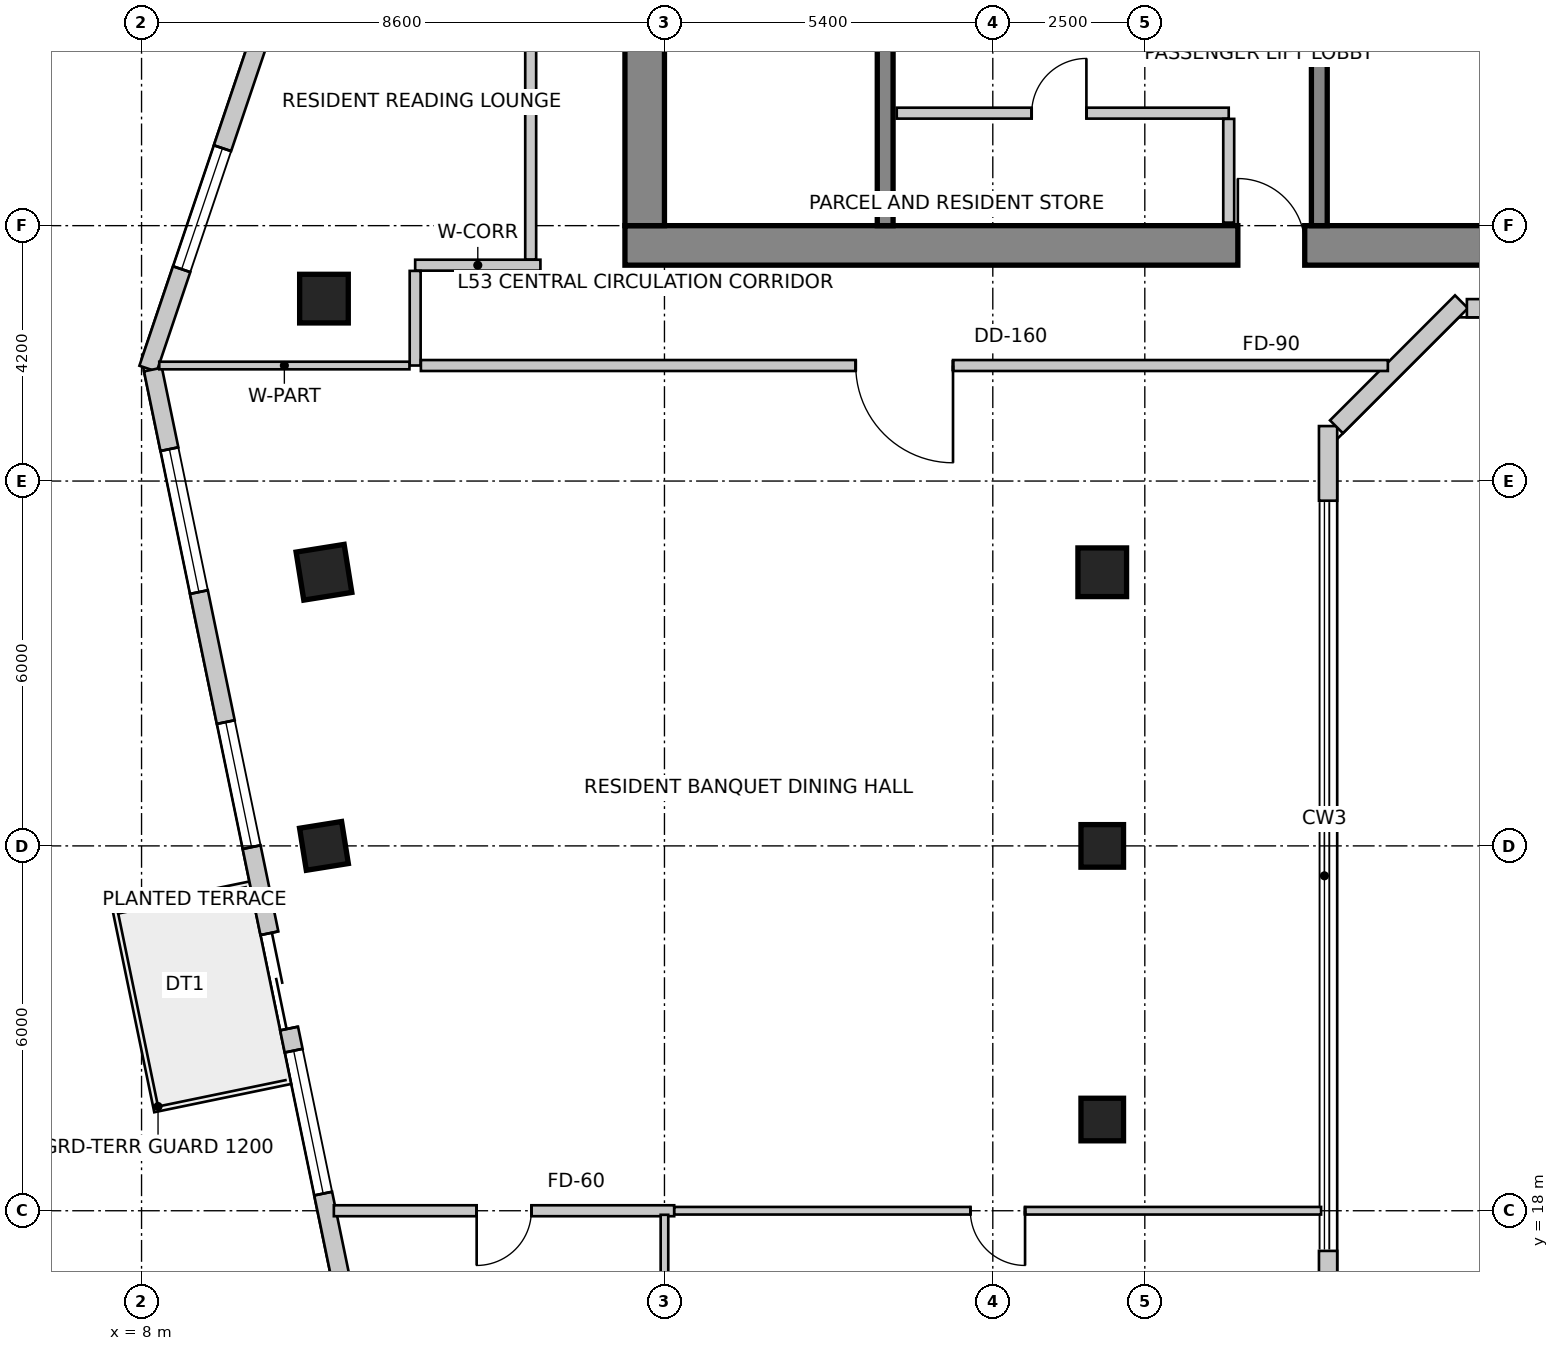
"""IFC4 building model, lengths in metres.
Left out: names, types, materials, properties, quantities, classifications, styles, units other than length and angle.
Written with IfcOpenShell. Run it as: python <this file> out.ifc"""

import sys

from ifc_helpers import new_model, si_unit, direction, frame, frame_2d, origin, origin_2d, place, context, subcontext, project, spatial, rectangle, extrude, source, transform, mapped, element, fill, save


model = new_model("IFC4")
c1 = context("Model", 3, precision=1e-05, world=origin(), true_north=direction((0.0, 1.0)))
c2 = subcontext(c1, "Body", "Model", "MODEL_VIEW")
j1 = project(units=[si_unit("LENGTHUNIT", "METRE"), si_unit("PLANEANGLEUNIT", "RADIAN")], contexts=[c1])
p1 = place(None, origin())
s1 = spatial("IfcSite", under=j1, at=p1, CompositionType="ELEMENT")
p2 = place(p1, origin())
s2 = spatial("IfcBuilding", under=s1, at=p2, CompositionType="ELEMENT")
p3 = place(p2, frame((0.0, 0.0, 211.4)))
s3 = spatial("IfcBuildingStorey", under=s2, at=p3, CompositionType="ELEMENT", Elevation=211.4)
p4 = place(p3, frame((15.95, 33.875, 0.0), z_axis=(0.0, 0.0, 1.0), x_axis=(1.0, 0.0, 0.0)))
e1 = element("IfcWall", 1, at=p4, inside=s3, PredefinedType="SHEAR", context=c2, shape_type="SweptSolid", body=[
    extrude(rectangle(XDim=15.7, YDim=0.65, at=frame_2d((7.85, 0.0))), origin(), (0.0, 0.0, 1.0), 3.5),
])
m1 = source(origin(), c2, "Body", "SweptSolid", [
    extrude(rectangle(XDim=1.1, YDim=2.15, at=frame_2d((0.55, 1.075))), frame((0.0, 0.335, 0.0), z_axis=(0.0, -1.0, 0.0), x_axis=(1.0, 0.0, 0.0)), (0.0, 0.0, 1.0), 0.67),
])
p5 = place(p4, frame((10.08, 0.0, 0.0)))
e2 = element("IfcOpeningElement", 2, at=p5, cuts=e1, PredefinedType="OPENING", context=c2, shape_type="MappedRepresentation", body=[
    mapped(m1, transform((0.0, 0.0, 0.0), scale=1.0)),
])
p6 = place(p3, frame((16.275, 34.2, 0.0), z_axis=(0.0, 0.0, 1.0), x_axis=(0.0, 1.0, 0.0)))
e3 = element("IfcWall", 3, at=p6, inside=s3, PredefinedType="SHEAR", context=c2, shape_type="SweptSolid", body=[
    extrude(rectangle(XDim=11.4, YDim=0.65, at=frame_2d((5.7, 0.0))), origin(), (0.0, 0.0, 1.0), 3.5),
])
p7 = place(p6, frame((7.15, 0.0, 0.0)))
e4 = element("IfcOpeningElement", 4, at=p7, cuts=e3, PredefinedType="OPENING", context=c2, shape_type="MappedRepresentation", body=[
    mapped(m1, transform((0.0, 0.0, 0.0), scale=1.0)),
])
p8 = place(p3, frame((20.23, 34.2, 0.0), z_axis=(0.0, 0.0, 1.0), x_axis=(0.0, 1.0, 0.0)))
e5 = element("IfcWall", 5, at=p8, inside=s3, PredefinedType="SHEAR", context=c2, shape_type="SweptSolid", body=[
    extrude(rectangle(XDim=9.06, YDim=0.26, at=frame_2d((4.53, 0.0))), origin(), (0.0, 0.0, 1.0), 3.5),
])
m2 = source(origin(), c2, "Body", "SweptSolid", [
    extrude(rectangle(XDim=1.1, YDim=2.15, at=frame_2d((0.55, 1.075))), frame((0.0, 0.14, 0.0), z_axis=(0.0, -1.0, 0.0), x_axis=(1.0, 0.0, 0.0)), (0.0, 0.0, 1.0), 0.28),
])
p9 = place(p8, frame((7.45, 0.0, 0.0)))
e6 = element("IfcOpeningElement", 6, at=p9, cuts=e5, PredefinedType="OPENING", context=c2, shape_type="MappedRepresentation", body=[
    mapped(m2, transform((0.0, 0.0, 0.0), scale=1.0)),
])
p10 = place(p3, frame((27.37, 34.2, 0.0), z_axis=(0.0, 0.0, 1.0), x_axis=(0.0, 1.0, 0.0)))
e7 = element("IfcWall", 7, at=p10, inside=s3, PredefinedType="SHEAR", context=c2, shape_type="SweptSolid", body=[
    extrude(rectangle(XDim=9.06, YDim=0.26, at=frame_2d((4.53, 0.0))), origin(), (0.0, 0.0, 1.0), 3.5),
])
p11 = place(p10, frame((7.45, 0.0, 0.0)))
e8 = element("IfcOpeningElement", 8, at=p11, cuts=e7, PredefinedType="OPENING", context=c2, shape_type="MappedRepresentation", body=[
    mapped(m2, transform((0.0, 0.0, 0.0), scale=1.0)),
])
m3 = source(origin(), c2, "Body", "SweptSolid", [
    extrude(rectangle(XDim=0.8, YDim=0.8, at=origin_2d()), origin(), (0.0, 0.0, 1.0), 3.5),
])
for number, where, z_axis, x_axis in (
    (9, (11.0, 33.0, 0.0), (0.0, 0.0, 1.0), (1.0, 0.0, 0.0)),
    (10, (11.0, 28.5, 0.0), (0.0, 0.0, 1.0), (0.158, -0.987, 0.0)),
):
    element("IfcColumn", number, at=place(p3, frame(where, z_axis=z_axis, x_axis=x_axis)), inside=s3, PredefinedType="COLUMN", context=c2, shape_type="MappedRepresentation", body=[
        mapped(m3, transform((0.0, 0.0, 0.0), scale=1.0)),
    ])
m4 = source(origin(), c2, "Body", "SweptSolid", [
    extrude(rectangle(XDim=0.7, YDim=0.7, at=origin_2d()), origin(), (0.0, 0.0, 1.0), 3.5),
])
p12 = place(p3, frame((11.0, 24.0, 0.0), z_axis=(0.0, 0.0, 1.0), x_axis=(0.158158067254, -0.987413806751, 0.0)))
e11 = element("IfcColumn", 11, at=p12, inside=s3, PredefinedType="COLUMN", context=c2, shape_type="MappedRepresentation", body=[
    mapped(m4, transform((0.0, 0.0, 0.0), scale=1.0)),
])
p13 = place(p3, frame((23.8, 28.5, 0.0), z_axis=(0.0, 0.0, 1.0), x_axis=(1.0, 0.0, 0.0)))
e12 = element("IfcColumn", 12, at=p13, inside=s3, PredefinedType="COLUMN", context=c2, shape_type="MappedRepresentation", body=[
    mapped(m3, transform((0.0, 0.0, 0.0), scale=1.0)),
])
for number, where, z_axis, x_axis in (
    (13, (23.8, 24.0, 0.0), (0.0, 0.0, 1.0), (1.0, 0.0, 0.0)),
    (14, (23.8, 19.5, 0.0), (0.0, 0.0, 1.0), (1.0, 0.0, 0.0)),
):
    element("IfcColumn", number, at=place(p3, frame(where, z_axis=z_axis, x_axis=x_axis)), inside=s3, PredefinedType="COLUMN", context=c2, shape_type="MappedRepresentation", body=[
        mapped(m4, transform((0.0, 0.0, 0.0), scale=1.0)),
    ])
p14 = place(p3, frame((27.514, 16.457, 0.0), z_axis=(0.0, 0.0, 1.0), x_axis=(0.0, 1.0, 0.0)))
e15 = element("IfcWall", 15, at=p14, inside=s3, PredefinedType="SOLIDWALL", context=c2, shape_type="SweptSolid", body=[
    extrude(rectangle(XDim=0.882, YDim=0.3, at=frame_2d((0.441, 0.0))), origin(), (0.0, 0.0, 1.0), 3.25),
])
p15 = place(p3, frame((27.514, 29.677, 0.0), z_axis=(0.0, 0.0, 1.0), x_axis=(0.0, 1.0, 0.0)))
e16 = element("IfcWall", 16, at=p15, inside=s3, PredefinedType="SOLIDWALL", context=c2, shape_type="SweptSolid", body=[
    extrude(rectangle(XDim=1.228, YDim=0.3, at=frame_2d((0.614, 0.0))), origin(), (0.0, 0.0, 1.0), 3.25),
])
p16 = place(p3, frame((27.652, 30.892, 0.0), z_axis=(0.0, 0.0, 1.0), x_axis=(0.707106781187, 0.707106781187, 0.0)))
e17 = element("IfcWall", 17, at=p16, inside=s3, PredefinedType="SOLIDWALL", context=c2, shape_type="SweptSolid", body=[
    extrude(rectangle(XDim=2.907, YDim=0.3, at=frame_2d((1.454, 0.0))), origin(), (0.0, 0.0, 1.0), 3.25),
])
p17 = place(p3, frame((29.797, 32.842, 0.0), z_axis=(0.0, 0.0, 1.0), x_axis=(1.0, 0.0, 0.0)))
e18 = element("IfcWall", 18, at=p17, inside=s3, PredefinedType="SOLIDWALL", context=c2, shape_type="SweptSolid", body=[
    extrude(rectangle(XDim=0.882, YDim=0.3, at=frame_2d((0.441, 0.0))), origin(), (0.0, 0.0, 1.0), 3.25),
])
p18 = place(p3, frame((13.269, 47.134, 0.0), z_axis=(0.0, 0.0, 1.0), x_axis=(-0.319920776449, -0.947444297464, 0.0)))
e19 = element("IfcWall", 19, at=p18, inside=s3, PredefinedType="SOLIDWALL", context=c2, shape_type="SweptSolid", body=[
    extrude(rectangle(XDim=16.133, YDim=0.3, at=frame_2d((8.067, 0.0))), origin(), (0.0, 0.0, 1.0), 3.25),
])
m5 = source(origin(), c2, "Body", "SweptSolid", [
    extrude(rectangle(XDim=2.1, YDim=2.0, at=frame_2d((1.05, 1.0))), frame((0.0, 0.16, 0.0), z_axis=(0.0, -1.0, 0.0), x_axis=(1.0, 0.0, 0.0)), (0.0, 0.0, 1.0), 0.32),
])
p19 = place(p18, frame((2.513, 0.0, 0.85)))
e20 = element("IfcOpeningElement", 20, at=p19, cuts=e19, PredefinedType="OPENING", context=c2, shape_type="MappedRepresentation", body=[
    mapped(m5, transform((0.0, 0.0, 0.0), scale=1.0)),
])
m6 = source(origin(), c2, "Body", "SweptSolid", [
    extrude(rectangle(XDim=2.4, YDim=2.2, at=frame_2d((1.2, 1.1))), frame((0.0, 0.16, 0.0), z_axis=(0.0, -1.0, 0.0), x_axis=(1.0, 0.0, 0.0)), (0.0, 0.0, 1.0), 0.32),
])
p20 = place(p18, frame((7.26, 0.0, 0.85)))
e21 = element("IfcOpeningElement", 21, at=p20, cuts=e19, PredefinedType="OPENING", context=c2, shape_type="MappedRepresentation", body=[
    mapped(m6, transform((0.0, 0.0, 0.0), scale=1.0)),
])
p21 = place(p18, frame((12.307, 0.0, 0.85)))
e22 = element("IfcOpeningElement", 22, at=p21, cuts=e19, PredefinedType="OPENING", context=c2, shape_type="MappedRepresentation", body=[
    mapped(m5, transform((0.0, 0.0, 0.0), scale=1.0)),
])
p22 = place(p3, frame((8.188, 31.834, 0.0), z_axis=(0.0, 0.0, 1.0), x_axis=(0.202303475707, -0.979322880217, 0.0)))
e23 = element("IfcWall", 23, at=p22, inside=s3, PredefinedType="SOLIDWALL", context=c2, shape_type="SweptSolid", body=[
    extrude(rectangle(XDim=15.766, YDim=0.3, at=frame_2d((7.883, 0.0))), origin(), (0.0, 0.0, 1.0), 3.25),
])
m7 = source(origin(), c2, "Body", "SweptSolid", [
    extrude(rectangle(XDim=1.6, YDim=2.15, at=frame_2d((0.8, 1.075))), frame((0.0, 0.16, 0.0), z_axis=(0.0, -1.0, 0.0), x_axis=(1.0, 0.0, 0.0)), (0.0, 0.0, 1.0), 0.32),
])
p23 = place(p22, frame((9.466, 0.0, 0.0)))
e24 = element("IfcOpeningElement", 24, at=p23, cuts=e23, PredefinedType="OPENING", context=c2, shape_type="MappedRepresentation", body=[
    mapped(m7, transform((0.0, 0.0, 0.0), scale=1.0)),
])
p24 = place(p22, frame((1.337, 0.0, 0.85)))
e25 = element("IfcOpeningElement", 25, at=p24, cuts=e23, PredefinedType="OPENING", context=c2, shape_type="MappedRepresentation", body=[
    mapped(m6, transform((0.0, 0.0, 0.0), scale=1.0)),
])
p25 = place(p22, frame((5.92, 0.0, 0.85)))
e26 = element("IfcOpeningElement", 26, at=p25, cuts=e23, PredefinedType="OPENING", context=c2, shape_type="MappedRepresentation", body=[
    mapped(m5, transform((0.0, 0.0, 0.0), scale=1.0)),
])
p26 = place(p22, frame((11.438, 0.0, 0.85)))
e27 = element("IfcOpeningElement", 27, at=p26, cuts=e23, PredefinedType="OPENING", context=c2, shape_type="MappedRepresentation", body=[
    mapped(m6, transform((0.0, 0.0, 0.0), scale=1.0)),
])
p27 = place(p3, frame((20.42, 36.05, 0.0), z_axis=(0.0, 0.0, 1.0), x_axis=(1.0, 0.0, 0.0)))
e28 = element("IfcWall", 28, at=p27, inside=s3, PredefinedType="PARTITIONING", context=c2, shape_type="SweptSolid", body=[
    extrude(rectangle(XDim=5.46, YDim=0.18, at=frame_2d((2.73, 0.0))), origin(), (0.0, 0.0, 1.0), 3.25),
])
m8 = source(origin(), c2, "Body", "SweptSolid", [
    extrude(rectangle(XDim=0.9, YDim=2.15, at=frame_2d((0.45, 1.075))), frame((0.0, 0.1, 0.0), z_axis=(0.0, -1.0, 0.0), x_axis=(1.0, 0.0, 0.0)), (0.0, 0.0, 1.0), 0.2),
])
p28 = place(p27, frame((2.219, 0.0, 0.0)))
e29 = element("IfcOpeningElement", 29, at=p28, cuts=e28, PredefinedType="OPENING", context=c2, shape_type="MappedRepresentation", body=[
    mapped(m8, transform((0.0, 0.0, 0.0), scale=1.0)),
])
p29 = place(p3, frame((25.88, 35.956, 0.0), z_axis=(0.0, 0.0, 1.0), x_axis=(0.0, -1.0, 0.0)))
e30 = element("IfcWall", 30, at=p29, inside=s3, PredefinedType="PARTITIONING", context=c2, shape_type="SweptSolid", body=[
    extrude(rectangle(XDim=1.706, YDim=0.18, at=frame_2d((0.853, 0.0))), origin(), (0.0, 0.0, 1.0), 2.542),
])
p30 = place(p3, frame((12.5, 33.55, 0.0), z_axis=(0.0, 0.0, 1.0), x_axis=(1.0, 0.0, 0.0)))
e31 = element("IfcWall", 31, at=p30, inside=s3, PredefinedType="PARTITIONING", context=c2, shape_type="SweptSolid", body=[
    extrude(rectangle(XDim=2.06, YDim=0.18, at=frame_2d((1.03, 0.0))), origin(), (0.0, 0.0, 1.0), 3.25),
])
p31 = place(p3, frame((12.5, 31.9, 0.0), z_axis=(0.0, 0.0, 1.0), x_axis=(0.0, 1.0, 0.0)))
e32 = element("IfcWall", 32, at=p31, inside=s3, PredefinedType="PARTITIONING", context=c2, shape_type="SweptSolid", body=[
    extrude(rectangle(XDim=1.556, YDim=0.18, at=frame_2d((0.778, 0.0))), origin(), (0.0, 0.0, 1.0), 2.934),
])
p32 = place(p3, frame((28.497, 31.9, 0.0), z_axis=(0.0, 0.0, 1.0), x_axis=(-1.0, 0.0, 0.0)))
e33 = element("IfcWall", 33, at=p32, inside=s3, PredefinedType="PARTITIONING", context=c2, shape_type="SweptSolid", body=[
    extrude(rectangle(XDim=15.903, YDim=0.18, at=frame_2d((7.952, 0.0))), origin(), (0.0, 0.0, 1.0), 2.934),
])
m9 = source(origin(), c2, "Body", "SweptSolid", [
    extrude(rectangle(XDim=1.6, YDim=2.15, at=frame_2d((0.8, 1.075))), frame((0.0, 0.1, 0.0), z_axis=(0.0, -1.0, 0.0), x_axis=(1.0, 0.0, 0.0)), (0.0, 0.0, 1.0), 0.2),
])
p33 = place(p32, frame((7.152, 0.0, 0.0)))
e34 = element("IfcOpeningElement", 34, at=p33, cuts=e33, PredefinedType="OPENING", context=c2, shape_type="MappedRepresentation", body=[
    mapped(m9, transform((0.0, 0.0, 0.0), scale=1.0)),
])
p34 = place(p3, frame((14.4, 33.644, 0.0), z_axis=(0.0, 0.0, 1.0), x_axis=(0.0, 1.0, 0.0)))
e35 = element("IfcWall", 35, at=p34, inside=s3, PredefinedType="PARTITIONING", context=c2, shape_type="SweptSolid", body=[
    extrude(rectangle(XDim=12.606, YDim=0.18, at=frame_2d((6.303, 0.0))), origin(), (0.0, 0.0, 1.0), 3.25),
])
p35 = place(p34, frame((4.399, 0.0, 0.0)))
e36 = element("IfcOpeningElement", 36, at=p35, cuts=e35, PredefinedType="OPENING", context=c2, shape_type="MappedRepresentation", body=[
    mapped(m8, transform((0.0, 0.0, 0.0), scale=1.0)),
])
p36 = place(p3, frame((12.406, 31.9, 0.0), z_axis=(0.0, 0.0, 1.0), x_axis=(-1.0, 0.0, 0.0)))
e37 = element("IfcWall", 37, at=p36, inside=s3, PredefinedType="PARTITIONING", context=c2, shape_type="SweptSolid", body=[
    extrude(rectangle(XDim=4.115, YDim=0.125, at=frame_2d((2.057, 0.0))), origin(), (0.0, 0.0, 1.0), 2.542),
])
p37 = place(p3, frame((16.76, 18.0, 0.0), z_axis=(0.0, 0.0, 1.0), x_axis=(-1.0, 0.0, 0.0)))
e38 = element("IfcWall", 38, at=p37, inside=s3, PredefinedType="PARTITIONING", context=c2, shape_type="SweptSolid", body=[
    extrude(rectangle(XDim=5.597, YDim=0.18, at=frame_2d((2.799, 0.0))), origin(), (0.0, 0.0, 1.0), 3.25),
])
p38 = place(p37, frame((2.349, 0.0, 0.0)))
e39 = element("IfcOpeningElement", 39, at=p38, cuts=e38, PredefinedType="OPENING", context=c2, shape_type="MappedRepresentation", body=[
    mapped(m8, transform((0.0, 0.0, 0.0), scale=1.0)),
])
p39 = place(p3, frame((27.399, 18.0, 0.0), z_axis=(0.0, 0.0, 1.0), x_axis=(-1.0, 0.0, 0.0)))
e40 = element("IfcWall", 40, at=p39, inside=s3, PredefinedType="PARTITIONING", context=c2, shape_type="SweptSolid", body=[
    extrude(rectangle(XDim=10.637, YDim=0.125, at=frame_2d((5.318, 0.0))), origin(), (0.0, 0.0, 1.0), 2.542),
])
m10 = source(origin(), c2, "Body", "SweptSolid", [
    extrude(rectangle(XDim=0.9, YDim=2.15, at=frame_2d((0.45, 1.075))), frame((0.0, 0.073, 0.0), z_axis=(0.0, -1.0, 0.0), x_axis=(1.0, 0.0, 0.0)), (0.0, 0.0, 1.0), 0.145),
])
p40 = place(p39, frame((4.868, 0.0, 0.0)))
e41 = element("IfcOpeningElement", 41, at=p40, cuts=e40, PredefinedType="OPENING", context=c2, shape_type="MappedRepresentation", body=[
    mapped(m10, transform((0.0, 0.0, 0.0), scale=1.0)),
])
p41 = place(p3, frame((16.6, 17.934, 0.0), z_axis=(0.0, 0.0, 1.0), x_axis=(0.0, -1.0, 0.0)))
e42 = element("IfcWall", 42, at=p41, inside=s3, PredefinedType="PARTITIONING", context=c2, shape_type="SweptSolid", body=[
    extrude(rectangle(XDim=5.069, YDim=0.125, at=frame_2d((2.534, 0.0))), origin(), (0.0, 0.0, 1.0), 2.542),
])
m11 = source(origin(), c2, "Body", "SweptSolid", [
    extrude(rectangle(XDim=2.1, YDim=2.0, at=frame_2d((1.05, 1.0))), frame((0.0, -0.015, 0.0), z_axis=(0.0, -1.0, 0.0), x_axis=(1.0, 0.0, 0.0)), (0.0, 0.0, 1.0), 0.06),
])
p42 = place(p21, origin())
e43 = element("IfcWindow", 43, at=p42, inside=s3, PartitioningType="SINGLE_PANEL", PredefinedType="WINDOW", context=c2, shape_type="MappedRepresentation", body=[
    mapped(m11, transform((0.0, 0.0, 0.0), scale=1.0)),
])
fill(e22, e43)
m12 = source(origin(), c2, "Body", "SweptSolid", [
    extrude(rectangle(XDim=1.6, YDim=2.15, at=frame_2d((0.8, 1.075))), frame((0.0, 0.025, 0.0), z_axis=(0.0, -1.0, 0.0), x_axis=(1.0, 0.0, 0.0)), (0.0, 0.0, 1.0), 0.05),
])
p43 = place(p23, origin())
e44 = element("IfcDoor", 44, at=p43, inside=s3, OperationType="DOUBLE_DOOR_SLIDING", PredefinedType="DOOR", context=c2, shape_type="MappedRepresentation", body=[
    mapped(m12, transform((0.0, 0.0, 0.0), scale=1.0)),
])
fill(e24, e44)
m13 = source(origin(), c2, "Body", "SweptSolid", [
    extrude(rectangle(XDim=2.4, YDim=2.2, at=frame_2d((1.2, 1.1))), frame((0.0, -0.015, 0.0), z_axis=(0.0, -1.0, 0.0), x_axis=(1.0, 0.0, 0.0)), (0.0, 0.0, 1.0), 0.06),
])
p44 = place(p24, origin())
e45 = element("IfcWindow", 45, at=p44, inside=s3, PartitioningType="SINGLE_PANEL", PredefinedType="WINDOW", context=c2, shape_type="MappedRepresentation", body=[
    mapped(m13, transform((0.0, 0.0, 0.0), scale=1.0)),
])
fill(e25, e45)
p45 = place(p25, origin())
e46 = element("IfcWindow", 46, at=p45, inside=s3, PartitioningType="SINGLE_PANEL", PredefinedType="WINDOW", context=c2, shape_type="MappedRepresentation", body=[
    mapped(m11, transform((0.0, 0.0, 0.0), scale=1.0)),
])
fill(e26, e46)
p46 = place(p26, origin())
e47 = element("IfcWindow", 47, at=p46, inside=s3, PartitioningType="SINGLE_PANEL", PredefinedType="WINDOW", context=c2, shape_type="MappedRepresentation", body=[
    mapped(m13, transform((0.0, 0.0, 0.0), scale=1.0)),
])
fill(e27, e47)
m14 = source(origin(), c2, "Body", "SweptSolid", [
    extrude(rectangle(XDim=1.1, YDim=2.15, at=frame_2d((0.55, 1.075))), frame((0.0, 0.025, 0.0), z_axis=(0.0, -1.0, 0.0), x_axis=(1.0, 0.0, 0.0)), (0.0, 0.0, 1.0), 0.05),
])
p47 = place(p5, origin())
e48 = element("IfcDoor", 48, at=p47, inside=s3, OperationType="SINGLE_SWING_LEFT", PredefinedType="DOOR", context=c2, shape_type="MappedRepresentation", body=[
    mapped(m14, transform((0.0, 0.0, 0.0), scale=1.0)),
])
fill(e2, e48)
m15 = source(origin(), c2, "Body", "SweptSolid", [
    extrude(rectangle(XDim=0.9, YDim=2.15, at=frame_2d((0.45, 1.075))), frame((0.0, 0.025, 0.0), z_axis=(0.0, -1.0, 0.0), x_axis=(1.0, 0.0, 0.0)), (0.0, 0.0, 1.0), 0.05),
])
p48 = place(p28, origin())
e49 = element("IfcDoor", 49, at=p48, inside=s3, OperationType="SINGLE_SWING_RIGHT", PredefinedType="DOOR", context=c2, shape_type="MappedRepresentation", body=[
    mapped(m15, transform((0.0, 0.0, 0.0), scale=1.0)),
])
fill(e29, e49)
m16 = source(origin(), c2, "Body", "SweptSolid", [
    extrude(rectangle(XDim=1.6, YDim=2.15, at=frame_2d((0.8, 1.075))), frame((0.0, 0.025, 0.0), z_axis=(0.0, -1.0, 0.0), x_axis=(1.0, 0.0, 0.0)), (0.0, 0.0, 1.0), 0.05),
])
p49 = place(p33, origin())
e50 = element("IfcDoor", 50, at=p49, inside=s3, OperationType="SINGLE_SWING_LEFT", PredefinedType="DOOR", context=c2, shape_type="MappedRepresentation", body=[
    mapped(m16, transform((0.0, 0.0, 0.0), scale=1.0)),
])
fill(e34, e50)
p50 = place(p38, origin())
e51 = element("IfcDoor", 51, at=p50, inside=s3, OperationType="SINGLE_SWING_RIGHT", PredefinedType="DOOR", context=c2, shape_type="MappedRepresentation", body=[
    mapped(m15, transform((0.0, 0.0, 0.0), scale=1.0)),
])
fill(e39, e51)
m17 = source(origin(), c2, "Body", "SweptSolid", [
    extrude(rectangle(XDim=0.9, YDim=2.15, at=frame_2d((0.45, 1.075))), frame((0.0, 0.025, 0.0), z_axis=(0.0, -1.0, 0.0), x_axis=(1.0, 0.0, 0.0)), (0.0, 0.0, 1.0), 0.05),
])
p51 = place(p40, origin())
e52 = element("IfcDoor", 52, at=p51, inside=s3, OperationType="SINGLE_SWING_LEFT", PredefinedType="DOOR", context=c2, shape_type="MappedRepresentation", body=[
    mapped(m17, transform((0.0, 0.0, 0.0), scale=1.0)),
])
fill(e41, e52)
save(model, sys.argv[1])
